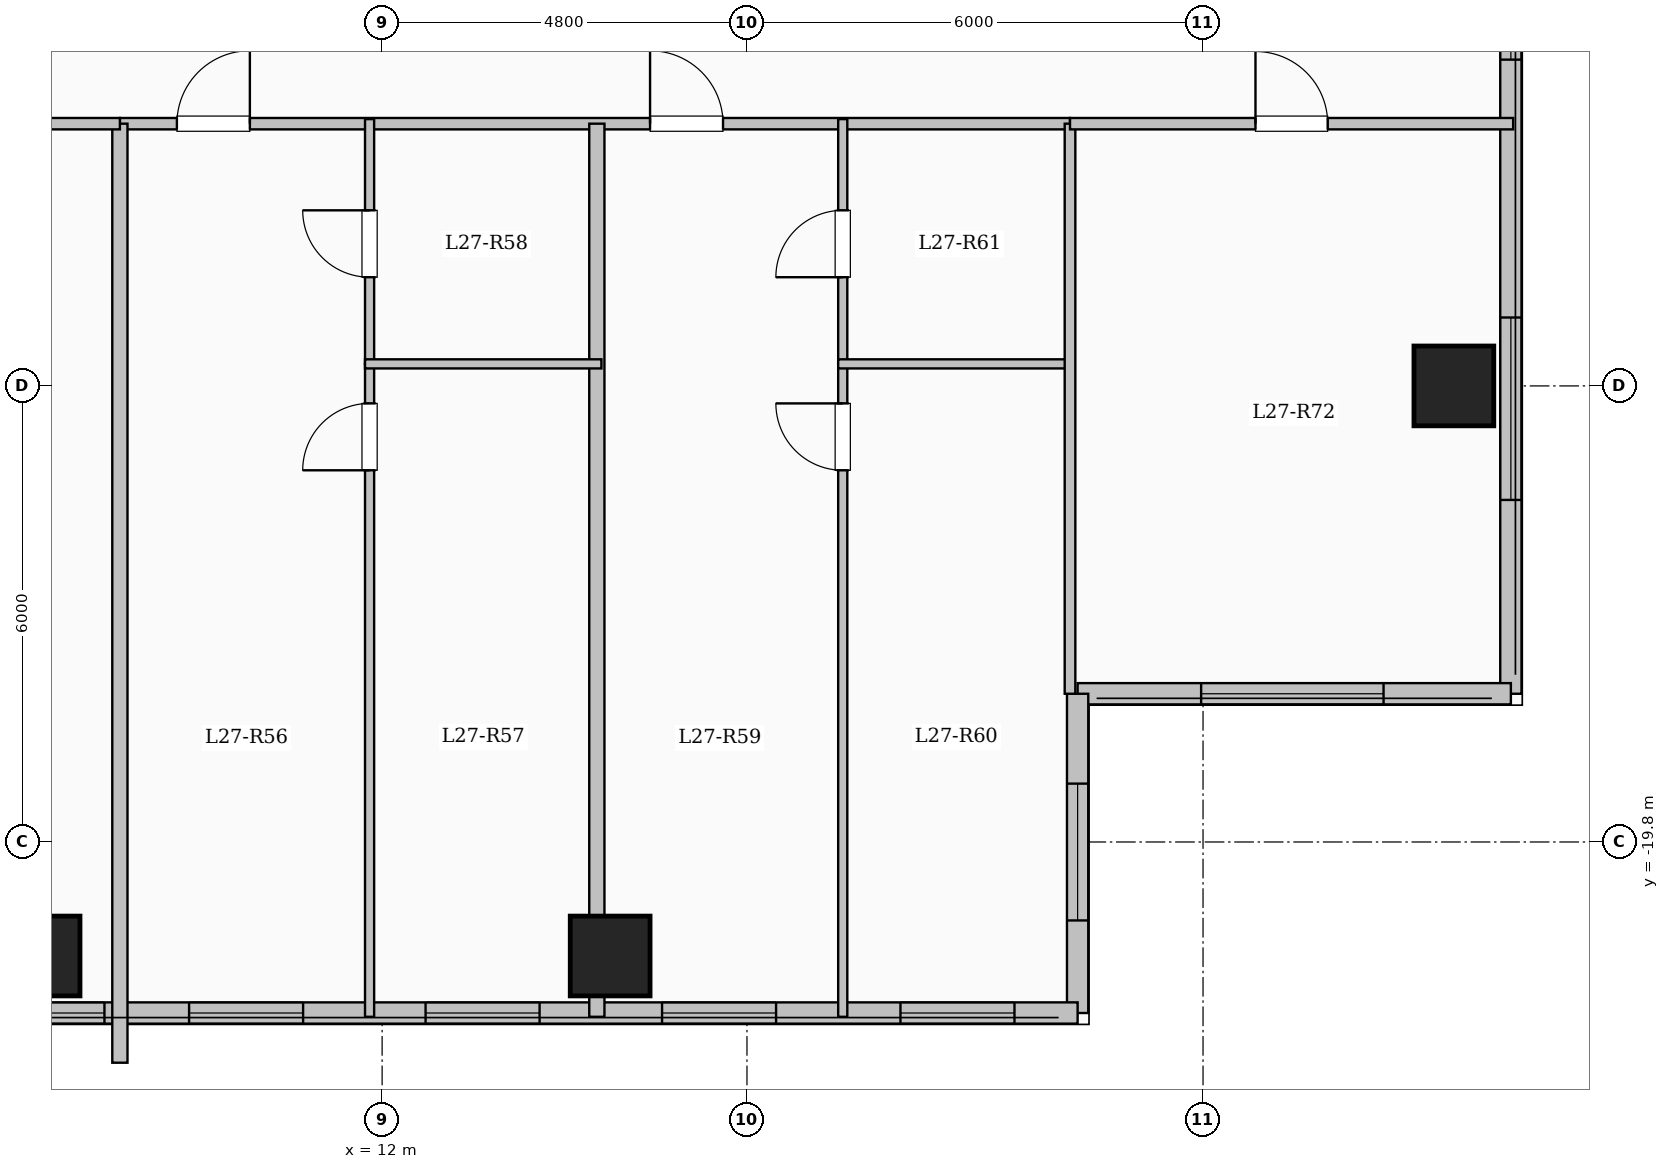
"""IFC4 building model, lengths in metres.
Left out: names, types, materials, properties, quantities, classifications, styles, units other than length and angle.
Written with IfcOpenShell. Run it as: python <this file> out.ifc"""

import sys

from ifc_helpers import new_model, si_unit, direction, frame, frame_2d, origin, origin_2d, place, context, subcontext, project, spatial, rectangle, extrude, element, fill, save


model = new_model("IFC4")
c1 = context("Model", 3, precision=1e-05, world=origin(), true_north=direction((0.0, 1.0)))
c2 = subcontext(c1, "Body", "Model", "MODEL_VIEW")
j1 = project(units=[si_unit("LENGTHUNIT", "METRE"), si_unit("PLANEANGLEUNIT", "RADIAN")], contexts=[c1])
p1 = place(None, origin())
s1 = spatial("IfcSite", under=j1, at=p1, CompositionType="ELEMENT")
p2 = place(p1, origin())
s2 = spatial("IfcBuilding", under=s1, at=p2, CompositionType="ELEMENT")
p3 = place(p2, frame((0.0, 0.0, 101.75)))
s3 = spatial("IfcBuildingStorey", under=s2, at=p3, CompositionType="ELEMENT", Elevation=101.75)
for number, where, z_axis, x_axis in (
    (1, (7.5, -21.3, 0.0), (0.0, 0.0, 1.0), (1.0, 0.0, 0.0)),
    (2, (15.0, -21.3, 0.0), (0.0, 0.0, 1.0), (1.0, 0.0, 0.0)),
    (3, (26.1, -13.8, 0.0), (0.0, 0.0, 1.0), (1.0, 0.0, 0.0)),
):
    element("IfcColumn", number, at=place(p3, frame(where, z_axis=z_axis, x_axis=x_axis)), inside=s3, PredefinedType="COLUMN", context=c2, shape_type="SweptSolid", body=[
        extrude(rectangle(XDim=1.05, YDim=1.05, at=origin_2d()), origin(), (0.0, 0.0, 1.0), 3.35),
    ])
p4 = place(p3, frame((26.85, 17.85, 0.0), z_axis=(0.0, 0.0, 1.0), x_axis=(0.0, -1.0, 0.0)))
e4 = element("IfcWall", 4, at=p4, inside=s3, PredefinedType="SOLIDWALL", context=c2, shape_type="SweptSolid", body=[
    extrude(rectangle(XDim=35.7, YDim=0.28, at=frame_2d((17.85, 0.0))), origin(), (0.0, 0.0, 1.0), 3.1),
])
p5 = place(p4, frame((1.675, 0.0, 0.9)))
e5 = element("IfcOpeningElement", 5, at=p5, cuts=e4, PredefinedType="OPENING", context=c2, shape_type="SweptSolid", body=[
    extrude(rectangle(XDim=2.0, YDim=1.7, at=frame_2d((1.0, 0.85))), frame((0.0, 0.15, 0.0), z_axis=(0.0, -1.0, 0.0), x_axis=(1.0, 0.0, 0.0)), (0.0, 0.0, 1.0), 0.3),
])
p6 = place(p4, frame((5.725, 0.0, 0.95)))
e6 = element("IfcOpeningElement", 6, at=p6, cuts=e4, PredefinedType="OPENING", context=c2, shape_type="SweptSolid", body=[
    extrude(rectangle(XDim=1.0, YDim=1.5, at=frame_2d((0.5, 0.75))), frame((0.0, 0.15, 0.0), z_axis=(0.0, -1.0, 0.0), x_axis=(1.0, 0.0, 0.0)), (0.0, 0.0, 1.0), 0.3),
])
p7 = place(p4, frame((15.1, 0.0, 0.9)))
e7 = element("IfcOpeningElement", 7, at=p7, cuts=e4, PredefinedType="OPENING", context=c2, shape_type="SweptSolid", body=[
    extrude(rectangle(XDim=2.0, YDim=1.7, at=frame_2d((1.0, 0.85))), frame((0.0, 0.15, 0.0), z_axis=(0.0, -1.0, 0.0), x_axis=(1.0, 0.0, 0.0)), (0.0, 0.0, 1.0), 0.3),
])
p8 = place(p4, frame((25.857, 0.0, 0.9)))
e8 = element("IfcOpeningElement", 8, at=p8, cuts=e4, PredefinedType="OPENING", context=c2, shape_type="SweptSolid", body=[
    extrude(rectangle(XDim=1.5, YDim=1.65, at=frame_2d((0.75, 0.825))), frame((0.0, 0.15, 0.0), z_axis=(0.0, -1.0, 0.0), x_axis=(1.0, 0.0, 0.0)), (0.0, 0.0, 1.0), 0.3),
])
p9 = place(p4, frame((30.75, 0.0, 0.9)))
e9 = element("IfcOpeningElement", 9, at=p9, cuts=e4, PredefinedType="OPENING", context=c2, shape_type="SweptSolid", body=[
    extrude(rectangle(XDim=2.4, YDim=1.8, at=frame_2d((1.2, 0.9))), frame((0.0, 0.15, 0.0), z_axis=(0.0, -1.0, 0.0), x_axis=(1.0, 0.0, 0.0)), (0.0, 0.0, 1.0), 0.3),
])
p10 = place(p3, frame((26.85, -17.85, 0.0), z_axis=(0.0, 0.0, 1.0), x_axis=(-1.0, 0.0, 0.0)))
e10 = element("IfcWall", 10, at=p10, inside=s3, PredefinedType="SOLIDWALL", context=c2, shape_type="SweptSolid", body=[
    extrude(rectangle(XDim=5.7, YDim=0.28, at=frame_2d((2.85, 0.0))), origin(), (0.0, 0.0, 1.0), 3.1),
])
p11 = place(p10, frame((1.675, 0.0, 0.9)))
e11 = element("IfcOpeningElement", 11, at=p11, cuts=e10, PredefinedType="OPENING", context=c2, shape_type="SweptSolid", body=[
    extrude(rectangle(XDim=2.4, YDim=1.8, at=frame_2d((1.2, 0.9))), frame((0.0, 0.15, 0.0), z_axis=(0.0, -1.0, 0.0), x_axis=(1.0, 0.0, 0.0)), (0.0, 0.0, 1.0), 0.3),
])
p12 = place(p3, frame((21.15, -17.85, 0.0), z_axis=(0.0, 0.0, 1.0), x_axis=(0.0, -1.0, 0.0)))
e12 = element("IfcWall", 12, at=p12, inside=s3, PredefinedType="SOLIDWALL", context=c2, shape_type="SweptSolid", body=[
    extrude(rectangle(XDim=4.2, YDim=0.28, at=frame_2d((2.1, 0.0))), origin(), (0.0, 0.0, 1.0), 3.1),
])
p13 = place(p12, frame((1.182, 0.0, 0.9)))
e13 = element("IfcOpeningElement", 13, at=p13, cuts=e12, PredefinedType="OPENING", context=c2, shape_type="SweptSolid", body=[
    extrude(rectangle(XDim=1.8, YDim=1.65, at=frame_2d((0.9, 0.825))), frame((0.0, 0.15, 0.0), z_axis=(0.0, -1.0, 0.0), x_axis=(1.0, 0.0, 0.0)), (0.0, 0.0, 1.0), 0.3),
])
p14 = place(p3, frame((21.15, -22.05, 0.0), z_axis=(0.0, 0.0, 1.0), x_axis=(-1.0, 0.0, 0.0)))
e14 = element("IfcWall", 14, at=p14, inside=s3, PredefinedType="SOLIDWALL", context=c2, shape_type="SweptSolid", body=[
    extrude(rectangle(XDim=13.8, YDim=0.28, at=frame_2d((6.9, 0.0))), origin(), (0.0, 0.0, 1.0), 3.1),
])
p15 = place(p14, frame((0.831, 0.0, 0.9)))
e15 = element("IfcOpeningElement", 15, at=p15, cuts=e14, PredefinedType="OPENING", context=c2, shape_type="SweptSolid", body=[
    extrude(rectangle(XDim=1.5, YDim=1.65, at=frame_2d((0.75, 0.825))), frame((0.0, 0.15, 0.0), z_axis=(0.0, -1.0, 0.0), x_axis=(1.0, 0.0, 0.0)), (0.0, 0.0, 1.0), 0.3),
])
p16 = place(p14, frame((3.967, 0.0, 0.9)))
e16 = element("IfcOpeningElement", 16, at=p16, cuts=e14, PredefinedType="OPENING", context=c2, shape_type="SweptSolid", body=[
    extrude(rectangle(XDim=1.5, YDim=1.65, at=frame_2d((0.75, 0.825))), frame((0.0, 0.15, 0.0), z_axis=(0.0, -1.0, 0.0), x_axis=(1.0, 0.0, 0.0)), (0.0, 0.0, 1.0), 0.3),
])
p17 = place(p14, frame((7.078, 0.0, 0.9)))
e17 = element("IfcOpeningElement", 17, at=p17, cuts=e14, PredefinedType="OPENING", context=c2, shape_type="SweptSolid", body=[
    extrude(rectangle(XDim=1.5, YDim=1.65, at=frame_2d((0.75, 0.825))), frame((0.0, 0.15, 0.0), z_axis=(0.0, -1.0, 0.0), x_axis=(1.0, 0.0, 0.0)), (0.0, 0.0, 1.0), 0.3),
])
p18 = place(p14, frame((10.19, 0.0, 0.9)))
e18 = element("IfcOpeningElement", 18, at=p18, cuts=e14, PredefinedType="OPENING", context=c2, shape_type="SweptSolid", body=[
    extrude(rectangle(XDim=1.5, YDim=1.65, at=frame_2d((0.75, 0.825))), frame((0.0, 0.15, 0.0), z_axis=(0.0, -1.0, 0.0), x_axis=(1.0, 0.0, 0.0)), (0.0, 0.0, 1.0), 0.3),
])
p19 = place(p14, frame((12.803, 0.0, 0.95)))
e19 = element("IfcOpeningElement", 19, at=p19, cuts=e14, PredefinedType="OPENING", context=c2, shape_type="SweptSolid", body=[
    extrude(rectangle(XDim=0.85, YDim=1.5, at=frame_2d((0.425, 0.75))), frame((0.0, 0.15, 0.0), z_axis=(0.0, -1.0, 0.0), x_axis=(1.0, 0.0, 0.0)), (0.0, 0.0, 1.0), 0.3),
])
p20 = place(p3, frame((8.55, -10.35, 0.0), z_axis=(0.0, 0.0, 1.0), x_axis=(1.0, 0.0, 0.0)))
e20 = element("IfcWall", 20, at=p20, inside=s3, PredefinedType="PARTITIONING", context=c2, shape_type="SweptSolid", body=[
    extrude(rectangle(XDim=12.5, YDim=0.15, at=frame_2d((6.25, 0.0))), origin(), (0.0, 0.0, 1.0), 3.1),
])
p21 = place(p20, frame((0.75, 0.0, 0.0)))
e21 = element("IfcOpeningElement", 21, at=p21, cuts=e20, PredefinedType="OPENING", context=c2, shape_type="SweptSolid", body=[
    extrude(rectangle(XDim=0.96, YDim=2.15, at=frame_2d((0.48, 1.075))), frame((0.0, 0.085, 0.0), z_axis=(0.0, -1.0, 0.0), x_axis=(1.0, 0.0, 0.0)), (0.0, 0.0, 1.0), 0.17),
])
p22 = place(p20, frame((6.975, 0.0, 0.0)))
e22 = element("IfcOpeningElement", 22, at=p22, cuts=e20, PredefinedType="OPENING", context=c2, shape_type="SweptSolid", body=[
    extrude(rectangle(XDim=0.96, YDim=2.15, at=frame_2d((0.48, 1.075))), frame((0.0, 0.085, 0.0), z_axis=(0.0, -1.0, 0.0), x_axis=(1.0, 0.0, 0.0)), (0.0, 0.0, 1.0), 0.17),
])
p23 = place(p3, frame((14.825, -22.1, 0.0), z_axis=(0.0, 0.0, 1.0), x_axis=(0.0, 1.0, 0.0)))
e23 = element("IfcWall", 23, at=p23, inside=s3, PredefinedType="SOLIDWALL", context=c2, shape_type="SweptSolid", body=[
    extrude(rectangle(XDim=11.75, YDim=0.2, at=frame_2d((5.875, 0.0))), origin(), (0.0, 0.0, 1.0), 2.435),
])
p24 = place(p3, frame((11.835, -22.1, 0.0), z_axis=(0.0, 0.0, 1.0), x_axis=(0.0, 1.0, 0.0)))
e24 = element("IfcWall", 24, at=p24, inside=s3, PredefinedType="PARTITIONING", context=c2, shape_type="SweptSolid", body=[
    extrude(rectangle(XDim=8.59, YDim=0.12, at=frame_2d((4.295, 0.0))), origin(), (0.0, 0.0, 1.0), 3.1),
])
p25 = place(p24, frame((7.19, 0.0, 0.0)))
e25 = element("IfcOpeningElement", 25, at=p25, cuts=e24, PredefinedType="OPENING", context=c2, shape_type="SweptSolid", body=[
    extrude(rectangle(XDim=0.88, YDim=2.1, at=frame_2d((0.44, 1.05))), frame((0.0, 0.07, 0.0), z_axis=(0.0, -1.0, 0.0), x_axis=(1.0, 0.0, 0.0)), (0.0, 0.0, 1.0), 0.14),
])
p26 = place(p3, frame((11.835, -13.51, 0.0), z_axis=(0.0, 0.0, 1.0), x_axis=(0.0, 1.0, 0.0)))
e26 = element("IfcWall", 26, at=p26, inside=s3, PredefinedType="PARTITIONING", context=c2, shape_type="SweptSolid", body=[
    extrude(rectangle(XDim=3.22, YDim=0.12, at=frame_2d((1.61, 0.0))), origin(), (0.0, 0.0, 1.0), 3.1),
])
p27 = place(p26, frame((1.14, 0.0, 0.0)))
e27 = element("IfcOpeningElement", 27, at=p27, cuts=e26, PredefinedType="OPENING", context=c2, shape_type="SweptSolid", body=[
    extrude(rectangle(XDim=0.88, YDim=2.1, at=frame_2d((0.44, 1.05))), frame((0.0, 0.07, 0.0), z_axis=(0.0, -1.0, 0.0), x_axis=(1.0, 0.0, 0.0)), (0.0, 0.0, 1.0), 0.14),
])
p28 = place(p3, frame((11.775, -13.51, 0.0), z_axis=(0.0, 0.0, 1.0), x_axis=(1.0, 0.0, 0.0)))
e28 = element("IfcWall", 28, at=p28, inside=s3, PredefinedType="PARTITIONING", context=c2, shape_type="SweptSolid", body=[
    extrude(rectangle(XDim=3.11, YDim=0.12, at=frame_2d((1.555, 0.0))), origin(), (0.0, 0.0, 1.0), 3.1),
])
p29 = place(p3, frame((18.06, -22.1, 0.0), z_axis=(0.0, 0.0, 1.0), x_axis=(0.0, 1.0, 0.0)))
e29 = element("IfcWall", 29, at=p29, inside=s3, PredefinedType="PARTITIONING", context=c2, shape_type="SweptSolid", body=[
    extrude(rectangle(XDim=8.59, YDim=0.12, at=frame_2d((4.295, 0.0))), origin(), (0.0, 0.0, 1.0), 3.1),
])
p30 = place(p29, frame((7.19, 0.0, 0.0)))
e30 = element("IfcOpeningElement", 30, at=p30, cuts=e29, PredefinedType="OPENING", context=c2, shape_type="SweptSolid", body=[
    extrude(rectangle(XDim=0.88, YDim=2.1, at=frame_2d((0.44, 1.05))), frame((0.0, 0.07, 0.0), z_axis=(0.0, -1.0, 0.0), x_axis=(1.0, 0.0, 0.0)), (0.0, 0.0, 1.0), 0.14),
])
p31 = place(p3, frame((18.06, -13.51, 0.0), z_axis=(0.0, 0.0, 1.0), x_axis=(0.0, 1.0, 0.0)))
e31 = element("IfcWall", 31, at=p31, inside=s3, PredefinedType="PARTITIONING", context=c2, shape_type="SweptSolid", body=[
    extrude(rectangle(XDim=3.22, YDim=0.12, at=frame_2d((1.61, 0.0))), origin(), (0.0, 0.0, 1.0), 3.1),
])
p32 = place(p31, frame((1.14, 0.0, 0.0)))
e32 = element("IfcOpeningElement", 32, at=p32, cuts=e31, PredefinedType="OPENING", context=c2, shape_type="SweptSolid", body=[
    extrude(rectangle(XDim=0.88, YDim=2.1, at=frame_2d((0.44, 1.05))), frame((0.0, 0.07, 0.0), z_axis=(0.0, -1.0, 0.0), x_axis=(1.0, 0.0, 0.0)), (0.0, 0.0, 1.0), 0.14),
])
p33 = place(p3, frame((18.0, -13.51, 0.0), z_axis=(0.0, 0.0, 1.0), x_axis=(1.0, 0.0, 0.0)))
e33 = element("IfcWall", 33, at=p33, inside=s3, PredefinedType="PARTITIONING", context=c2, shape_type="SweptSolid", body=[
    extrude(rectangle(XDim=3.11, YDim=0.12, at=frame_2d((1.555, 0.0))), origin(), (0.0, 0.0, 1.0), 3.1),
])
p34 = place(p3, frame((8.55, -22.704, 0.0), z_axis=(0.0, 0.0, 1.0), x_axis=(0.0, 1.0, 0.0)))
e34 = element("IfcWall", 34, at=p34, inside=s3, PredefinedType="SOLIDWALL", context=c2, shape_type="SweptSolid", body=[
    extrude(rectangle(XDim=12.354, YDim=0.2, at=frame_2d((6.177, 0.0))), origin(), (0.0, 0.0, 1.0), 3.1),
])
p35 = place(p3, frame((-8.55, -10.35, 0.0), z_axis=(0.0, 0.0, 1.0), x_axis=(1.0, 0.0, 0.0)))
e35 = element("IfcWall", 35, at=p35, inside=s3, PredefinedType="PARTITIONING", context=c2, shape_type="SweptSolid", body=[
    extrude(rectangle(XDim=17.1, YDim=0.15, at=frame_2d((8.55, 0.0))), origin(), (0.0, 0.0, 1.0), 3.1),
])
p36 = place(p35, frame((1.6, 0.0, 0.0)))
e36 = element("IfcOpeningElement", 36, at=p36, cuts=e35, PredefinedType="OPENING", context=c2, shape_type="SweptSolid", body=[
    extrude(rectangle(XDim=0.95, YDim=2.15, at=frame_2d((0.475, 1.075))), frame((0.0, 0.085, 0.0), z_axis=(0.0, -1.0, 0.0), x_axis=(1.0, 0.0, 0.0)), (0.0, 0.0, 1.0), 0.17),
])
p37 = place(p35, frame((10.5, 0.0, 0.0)))
e37 = element("IfcOpeningElement", 37, at=p37, cuts=e35, PredefinedType="OPENING", context=c2, shape_type="SweptSolid", body=[
    extrude(rectangle(XDim=0.95, YDim=2.15, at=frame_2d((0.475, 1.075))), frame((0.0, 0.085, 0.0), z_axis=(0.0, -1.0, 0.0), x_axis=(1.0, 0.0, 0.0)), (0.0, 0.0, 1.0), 0.17),
])
p38 = place(p3, frame((21.05, -17.85, 0.0), z_axis=(0.0, 0.0, 1.0), x_axis=(0.0, 1.0, 0.0)))
e38 = element("IfcWall", 38, at=p38, inside=s3, PredefinedType="PARTITIONING", context=c2, shape_type="SweptSolid", body=[
    extrude(rectangle(XDim=7.5, YDim=0.14, at=frame_2d((3.75, 0.0))), origin(), (0.0, 0.0, 1.0), 3.1),
])
p39 = place(p3, frame((21.05, -10.35, 0.0), z_axis=(0.0, 0.0, 1.0), x_axis=(1.0, 0.0, 0.0)))
e39 = element("IfcWall", 39, at=p39, inside=s3, PredefinedType="PARTITIONING", context=c2, shape_type="SweptSolid", body=[
    extrude(rectangle(XDim=5.83, YDim=0.15, at=frame_2d((2.915, 0.0))), origin(), (0.0, 0.0, 1.0), 3.1),
])
p40 = place(p39, frame((2.44, 0.0, 0.0)))
e40 = element("IfcOpeningElement", 40, at=p40, cuts=e39, PredefinedType="OPENING", context=c2, shape_type="SweptSolid", body=[
    extrude(rectangle(XDim=0.95, YDim=2.15, at=frame_2d((0.475, 1.075))), frame((0.0, 0.085, 0.0), z_axis=(0.0, -1.0, 0.0), x_axis=(1.0, 0.0, 0.0)), (0.0, 0.0, 1.0), 0.17),
])
p41 = place(p8, origin())
e41 = element("IfcWindow", 41, at=p41, inside=s3, PartitioningType="SINGLE_PANEL", PredefinedType="WINDOW", context=c2, shape_type="SweptSolid", body=[
    extrude(rectangle(XDim=1.5, YDim=1.65, at=frame_2d((0.75, 0.825))), frame((0.0, 0.03, 0.0), z_axis=(0.0, -1.0, 0.0), x_axis=(1.0, 0.0, 0.0)), (0.0, 0.0, 1.0), 0.06),
])
fill(e8, e41)
p42 = place(p9, origin())
e42 = element("IfcWindow", 42, at=p42, inside=s3, PartitioningType="SINGLE_PANEL", PredefinedType="WINDOW", context=c2, shape_type="SweptSolid", body=[
    extrude(rectangle(XDim=2.4, YDim=1.8, at=frame_2d((1.2, 0.9))), frame((0.0, 0.03, 0.0), z_axis=(0.0, -1.0, 0.0), x_axis=(1.0, 0.0, 0.0)), (0.0, 0.0, 1.0), 0.06),
])
fill(e9, e42)
p43 = place(p11, origin())
e43 = element("IfcWindow", 43, at=p43, inside=s3, PartitioningType="SINGLE_PANEL", PredefinedType="WINDOW", context=c2, shape_type="SweptSolid", body=[
    extrude(rectangle(XDim=2.4, YDim=1.8, at=frame_2d((1.2, 0.9))), frame((0.0, 0.03, 0.0), z_axis=(0.0, -1.0, 0.0), x_axis=(1.0, 0.0, 0.0)), (0.0, 0.0, 1.0), 0.06),
])
fill(e11, e43)
p44 = place(p13, origin())
e44 = element("IfcWindow", 44, at=p44, inside=s3, PartitioningType="SINGLE_PANEL", PredefinedType="WINDOW", context=c2, shape_type="SweptSolid", body=[
    extrude(rectangle(XDim=1.8, YDim=1.65, at=frame_2d((0.9, 0.825))), frame((0.0, 0.03, 0.0), z_axis=(0.0, -1.0, 0.0), x_axis=(1.0, 0.0, 0.0)), (0.0, 0.0, 1.0), 0.06),
])
fill(e13, e44)
p45 = place(p15, origin())
e45 = element("IfcWindow", 45, at=p45, inside=s3, PartitioningType="SINGLE_PANEL", PredefinedType="WINDOW", context=c2, shape_type="SweptSolid", body=[
    extrude(rectangle(XDim=1.5, YDim=1.65, at=frame_2d((0.75, 0.825))), frame((0.0, 0.03, 0.0), z_axis=(0.0, -1.0, 0.0), x_axis=(1.0, 0.0, 0.0)), (0.0, 0.0, 1.0), 0.06),
])
fill(e15, e45)
p46 = place(p16, origin())
e46 = element("IfcWindow", 46, at=p46, inside=s3, PartitioningType="SINGLE_PANEL", PredefinedType="WINDOW", context=c2, shape_type="SweptSolid", body=[
    extrude(rectangle(XDim=1.5, YDim=1.65, at=frame_2d((0.75, 0.825))), frame((0.0, 0.03, 0.0), z_axis=(0.0, -1.0, 0.0), x_axis=(1.0, 0.0, 0.0)), (0.0, 0.0, 1.0), 0.06),
])
fill(e16, e46)
p47 = place(p17, origin())
e47 = element("IfcWindow", 47, at=p47, inside=s3, PartitioningType="SINGLE_PANEL", PredefinedType="WINDOW", context=c2, shape_type="SweptSolid", body=[
    extrude(rectangle(XDim=1.5, YDim=1.65, at=frame_2d((0.75, 0.825))), frame((0.0, 0.03, 0.0), z_axis=(0.0, -1.0, 0.0), x_axis=(1.0, 0.0, 0.0)), (0.0, 0.0, 1.0), 0.06),
])
fill(e17, e47)
p48 = place(p18, origin())
e48 = element("IfcWindow", 48, at=p48, inside=s3, PartitioningType="SINGLE_PANEL", PredefinedType="WINDOW", context=c2, shape_type="SweptSolid", body=[
    extrude(rectangle(XDim=1.5, YDim=1.65, at=frame_2d((0.75, 0.825))), frame((0.0, 0.03, 0.0), z_axis=(0.0, -1.0, 0.0), x_axis=(1.0, 0.0, 0.0)), (0.0, 0.0, 1.0), 0.06),
])
fill(e18, e48)
p49 = place(p19, origin())
e49 = element("IfcWindow", 49, at=p49, inside=s3, PartitioningType="SINGLE_PANEL", PredefinedType="WINDOW", context=c2, shape_type="SweptSolid", body=[
    extrude(rectangle(XDim=0.85, YDim=1.5, at=frame_2d((0.425, 0.75))), frame((0.0, 0.03, 0.0), z_axis=(0.0, -1.0, 0.0), x_axis=(1.0, 0.0, 0.0)), (0.0, 0.0, 1.0), 0.06),
])
fill(e19, e49)
p50 = place(p21, origin())
e50 = element("IfcDoor", 50, at=p50, inside=s3, OperationType="SINGLE_SWING_RIGHT", PredefinedType="DOOR", context=c2, shape_type="SweptSolid", body=[
    extrude(rectangle(XDim=0.96, YDim=2.15, at=frame_2d((0.48, 1.075))), frame((0.0, 0.025, 0.0), z_axis=(0.0, -1.0, 0.0), x_axis=(1.0, 0.0, 0.0)), (0.0, 0.0, 1.0), 0.05),
])
fill(e21, e50)
p51 = place(p25, origin())
e51 = element("IfcDoor", 51, at=p51, inside=s3, OperationType="SINGLE_SWING_LEFT", PredefinedType="DOOR", context=c2, shape_type="SweptSolid", body=[
    extrude(rectangle(XDim=0.88, YDim=2.1, at=frame_2d((0.44, 1.05))), frame((0.0, 0.025, 0.0), z_axis=(0.0, -1.0, 0.0), x_axis=(1.0, 0.0, 0.0)), (0.0, 0.0, 1.0), 0.05),
])
fill(e25, e51)
p52 = place(p27, origin())
e52 = element("IfcDoor", 52, at=p52, inside=s3, OperationType="SINGLE_SWING_RIGHT", PredefinedType="DOOR", context=c2, shape_type="SweptSolid", body=[
    extrude(rectangle(XDim=0.88, YDim=2.1, at=frame_2d((0.44, 1.05))), frame((0.0, 0.025, 0.0), z_axis=(0.0, -1.0, 0.0), x_axis=(1.0, 0.0, 0.0)), (0.0, 0.0, 1.0), 0.05),
])
fill(e27, e52)
p53 = place(p22, origin())
e53 = element("IfcDoor", 53, at=p53, inside=s3, OperationType="SINGLE_SWING_LEFT", PredefinedType="DOOR", context=c2, shape_type="SweptSolid", body=[
    extrude(rectangle(XDim=0.96, YDim=2.15, at=frame_2d((0.48, 1.075))), frame((0.0, 0.025, 0.0), z_axis=(0.0, -1.0, 0.0), x_axis=(1.0, 0.0, 0.0)), (0.0, 0.0, 1.0), 0.05),
])
fill(e22, e53)
p54 = place(p30, origin())
e54 = element("IfcDoor", 54, at=p54, inside=s3, OperationType="SINGLE_SWING_RIGHT", PredefinedType="DOOR", context=c2, shape_type="SweptSolid", body=[
    extrude(rectangle(XDim=0.88, YDim=2.1, at=frame_2d((0.44, 1.05))), frame((0.0, 0.025, 0.0), z_axis=(0.0, -1.0, 0.0), x_axis=(1.0, 0.0, 0.0)), (0.0, 0.0, 1.0), 0.05),
])
fill(e30, e54)
p55 = place(p32, origin())
e55 = element("IfcDoor", 55, at=p55, inside=s3, OperationType="SINGLE_SWING_LEFT", PredefinedType="DOOR", context=c2, shape_type="SweptSolid", body=[
    extrude(rectangle(XDim=0.88, YDim=2.1, at=frame_2d((0.44, 1.05))), frame((0.0, 0.025, 0.0), z_axis=(0.0, -1.0, 0.0), x_axis=(1.0, 0.0, 0.0)), (0.0, 0.0, 1.0), 0.05),
])
fill(e32, e55)
p56 = place(p40, origin())
e56 = element("IfcDoor", 56, at=p56, inside=s3, OperationType="SINGLE_SWING_LEFT", PredefinedType="DOOR", context=c2, shape_type="SweptSolid", body=[
    extrude(rectangle(XDim=0.95, YDim=2.15, at=frame_2d((0.475, 1.075))), frame((0.0, 0.025, 0.0), z_axis=(0.0, -1.0, 0.0), x_axis=(1.0, 0.0, 0.0)), (0.0, 0.0, 1.0), 0.05),
])
fill(e40, e56)
save(model, sys.argv[1])
